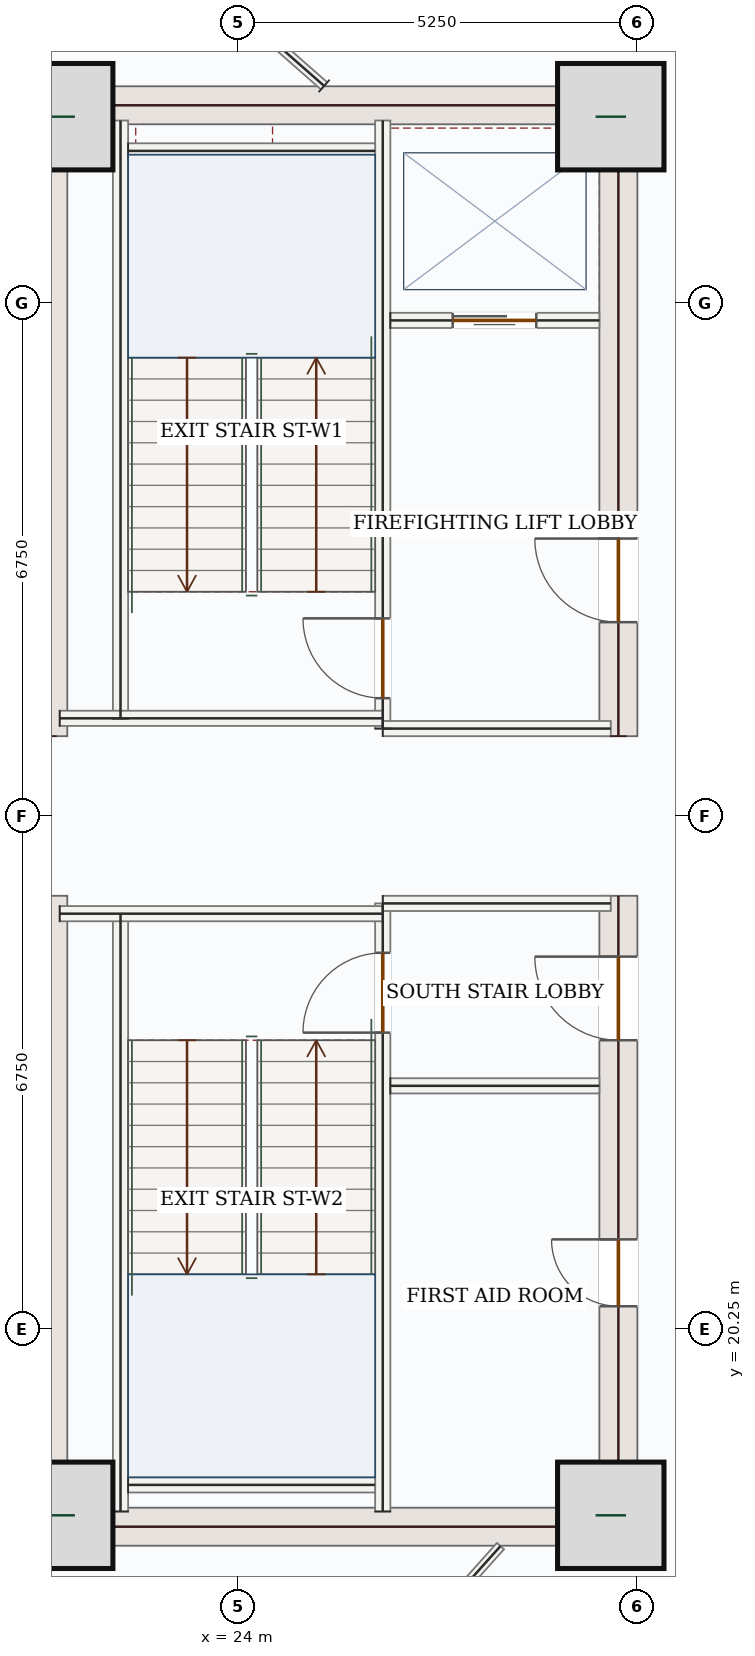
"""IFC4 building model, lengths in metres.
Left out: names, types, materials, properties, quantities, classifications, styles, units other than length and angle.
Written with IfcOpenShell. Run it as: python <this file> out.ifc"""

import sys

from ifc_helpers import new_model, si_unit, direction, frame, frame_2d, origin, origin_2d, place, context, subcontext, project, spatial, rectangle, extrude, source, transform, mapped, element, fill, save


model = new_model("IFC4")
c1 = context("Model", 3, precision=1e-05, world=origin(), true_north=direction((0.0, 1.0)))
c2 = subcontext(c1, "Body", "Model", "MODEL_VIEW")
j1 = project(units=[si_unit("LENGTHUNIT", "METRE"), si_unit("PLANEANGLEUNIT", "RADIAN")], contexts=[c1])
p1 = place(None, origin())
s1 = spatial("IfcSite", under=j1, at=p1, CompositionType="ELEMENT")
p2 = place(p1, origin())
s2 = spatial("IfcBuilding", under=s1, at=p2, CompositionType="ELEMENT")
p3 = place(p2, frame((0.0, 0.0, 66.9)))
s3 = spatial("IfcBuildingStorey", under=s2, at=p3, CompositionType="ELEMENT", Elevation=66.9)
m1 = source(origin(), c2, "Body", "SweptSolid", [
    extrude(rectangle(XDim=8.55, YDim=0.5, at=frame_2d((4.275, 0.0))), origin(), (0.0, 0.0, 1.0), 3.95),
])
for number, where, z_axis, x_axis in (
    (1, (21.5, 17.4, 0.0), (0.0, 0.0, 1.0), (0.0, 1.0, 0.0)),
    (2, (21.5, 28.05, 0.0), (0.0, 0.0, 1.0), (0.0, 1.0, 0.0)),
):
    element("IfcWall", number, at=place(p3, frame(where, z_axis=z_axis, x_axis=x_axis)), inside=s3, PredefinedType="SHEAR", context=c2, shape_type="MappedRepresentation", body=[
        mapped(m1, transform((0.0, 0.0, 0.0), x_axis=(1.0, 0.0, 0.0), y_axis=(0.0, 1.0, 0.0), z_axis=(0.0, 0.0, 1.0), scale=1.0)),
    ])
p4 = place(p3, frame((29.0, 17.4, 0.0), z_axis=(0.0, 0.0, 1.0), x_axis=(0.0, 1.0, 0.0)))
e3 = element("IfcWall", 3, at=p4, inside=s3, PredefinedType="SHEAR", context=c2, shape_type="SweptSolid", body=[
    extrude(rectangle(XDim=8.55, YDim=0.5, at=frame_2d((4.275, 0.0))), origin(), (0.0, 0.0, 1.0), 3.95),
])
p5 = place(p4, frame((6.65, 0.0, 0.0)))
e4 = element("IfcOpeningElement", 4, at=p5, cuts=e3, PredefinedType="OPENING", context=c2, shape_type="SweptSolid", body=[
    extrude(rectangle(XDim=1.1, YDim=2.2, at=frame_2d((0.55, 1.1))), frame((0.0, 0.26, 0.0), z_axis=(0.0, -1.0, 0.0), x_axis=(1.0, 0.0, 0.0)), (0.0, 0.0, 1.0), 0.52),
])
p6 = place(p4, frame((3.15, 0.0, 0.0)))
e5 = element("IfcOpeningElement", 5, at=p6, cuts=e3, PredefinedType="OPENING", context=c2, shape_type="SweptSolid", body=[
    extrude(rectangle(XDim=0.88, YDim=2.1, at=frame_2d((0.44, 1.05))), frame((0.0, 0.26, 0.0), z_axis=(0.0, -1.0, 0.0), x_axis=(1.0, 0.0, 0.0)), (0.0, 0.0, 1.0), 0.52),
])
p7 = place(p3, frame((29.0, 28.05, 0.0), z_axis=(0.0, 0.0, 1.0), x_axis=(0.0, 1.0, 0.0)))
e6 = element("IfcWall", 6, at=p7, inside=s3, PredefinedType="SHEAR", context=c2, shape_type="SweptSolid", body=[
    extrude(rectangle(XDim=8.55, YDim=0.5, at=frame_2d((4.275, 0.0))), origin(), (0.0, 0.0, 1.0), 3.95),
])
p8 = place(p7, frame((1.5, 0.0, 0.0)))
e7 = element("IfcOpeningElement", 7, at=p8, cuts=e6, PredefinedType="OPENING", context=c2, shape_type="SweptSolid", body=[
    extrude(rectangle(XDim=1.1, YDim=2.2, at=frame_2d((0.55, 1.1))), frame((0.0, 0.26, 0.0), z_axis=(0.0, -1.0, 0.0), x_axis=(1.0, 0.0, 0.0)), (0.0, 0.0, 1.0), 0.52),
])
m2 = source(origin(), c2, "Body", "SweptSolid", [
    extrude(rectangle(XDim=7.0, YDim=0.5, at=frame_2d((3.5, 0.0))), origin(), (0.0, 0.0, 1.0), 3.95),
])
for number, where, z_axis, x_axis in (
    (8, (21.75, 17.65, 0.0), (0.0, 0.0, 1.0), (1.0, 0.0, 0.0)),
    (9, (21.75, 36.35, 0.0), (0.0, 0.0, 1.0), (1.0, 0.0, 0.0)),
):
    element("IfcWall", number, at=place(p3, frame(where, z_axis=z_axis, x_axis=x_axis)), inside=s3, PredefinedType="SHEAR", context=c2, shape_type="MappedRepresentation", body=[
        mapped(m2, transform((0.0, 0.0, 0.0), x_axis=(1.0, 0.0, 0.0), y_axis=(0.0, 1.0, 0.0), z_axis=(0.0, 0.0, 1.0), scale=1.0)),
    ])
m3 = source(origin(), c2, "Body", "SweptSolid", [
    extrude(rectangle(XDim=1.4, YDim=1.4, at=origin_2d()), origin(), (0.0, 0.0, 1.0), 4.2),
])
for number, where, z_axis, x_axis in (
    (10, (21.65, 17.8, 0.0), (0.0, 0.0, 1.0), (1.0, 0.0, 0.0)),
    (11, (28.9, 17.8, 0.0), (0.0, 0.0, 1.0), (1.0, 0.0, 0.0)),
    (12, (21.65, 36.2, 0.0), (0.0, 0.0, 1.0), (1.0, 0.0, 0.0)),
    (13, (28.9, 36.2, 0.0), (0.0, 0.0, 1.0), (1.0, 0.0, 0.0)),
):
    element("IfcColumn", number, at=place(p3, frame(where, z_axis=z_axis, x_axis=x_axis)), inside=s3, PredefinedType="COLUMN", context=c2, shape_type="MappedRepresentation", body=[
        mapped(m3, transform((0.0, 0.0, 0.0), x_axis=(1.0, 0.0, 0.0), y_axis=(0.0, 1.0, 0.0), z_axis=(0.0, 0.0, 1.0), scale=1.0)),
    ])
p9 = place(p3, frame((22.658, 14.74, 0.0), z_axis=(0.0, 0.0, 1.0), x_axis=(-0.707106781187, 0.707106781187, 0.0)))
e14 = element("IfcWall", 14, at=p9, inside=s3, PredefinedType="SOLIDWALL", context=c2, shape_type="SweptSolid", body=[
    extrude(rectangle(XDim=5.258, YDim=0.32, at=frame_2d((2.629, 0.0))), origin(), (0.0, 0.0, 1.0), 3.95),
])
p10 = place(p9, frame((1.429, 0.0, 0.85)))
e15 = element("IfcOpeningElement", 15, at=p10, cuts=e14, PredefinedType="OPENING", context=c2, shape_type="SweptSolid", body=[
    extrude(rectangle(XDim=2.4, YDim=1.8, at=frame_2d((1.2, 0.9))), frame((0.0, 0.17, 0.0), z_axis=(0.0, -1.0, 0.0), x_axis=(1.0, 0.0, 0.0)), (0.0, 0.0, 1.0), 0.34),
])
m4 = source(origin(), c2, "Body", "SweptSolid", [
    extrude(rectangle(XDim=5.258, YDim=0.32, at=frame_2d((2.629, 0.0))), origin(), (0.0, 0.0, 1.0), 3.95),
])
p11 = place(p3, frame((18.94, 35.542, 0.0), z_axis=(0.0, 0.0, 1.0), x_axis=(0.707106781187, 0.707106781187, 0.0)))
e16 = element("IfcWall", 16, at=p11, inside=s3, PredefinedType="SOLIDWALL", context=c2, shape_type="MappedRepresentation", body=[
    mapped(m4, transform((0.0, 0.0, 0.0), x_axis=(1.0, 0.0, 0.0), y_axis=(0.0, 1.0, 0.0), z_axis=(0.0, 0.0, 1.0), scale=1.0)),
])
m5 = source(origin(), c2, "Body", "SweptSolid", [
    extrude(rectangle(XDim=7.87, YDim=0.2, at=frame_2d((3.935, 0.0))), origin(), (0.0, 0.0, 1.0), 3.95),
])
for number, where, z_axis, x_axis in (
    (17, (22.45, 17.85, 0.0), (0.0, 0.0, 1.0), (0.0, 1.0, 0.0)),
    (18, (22.45, 28.28, 0.0), (0.0, 0.0, 1.0), (0.0, 1.0, 0.0)),
):
    element("IfcWall", number, at=place(p3, frame(where, z_axis=z_axis, x_axis=x_axis)), inside=s3, PredefinedType="SOLIDWALL", context=c2, shape_type="MappedRepresentation", body=[
        mapped(m5, transform((0.0, 0.0, 0.0), x_axis=(1.0, 0.0, 0.0), y_axis=(0.0, 1.0, 0.0), z_axis=(0.0, 0.0, 1.0), scale=1.0)),
    ])
p12 = place(p3, frame((25.9, 17.85, 0.0), z_axis=(0.0, 0.0, 1.0), x_axis=(0.0, 1.0, 0.0)))
e19 = element("IfcWall", 19, at=p12, inside=s3, PredefinedType="SOLIDWALL", context=c2, shape_type="SweptSolid", body=[
    extrude(rectangle(XDim=8.0, YDim=0.2, at=frame_2d((4.0, 0.0))), origin(), (0.0, 0.0, 1.0), 3.95),
])
p13 = place(p12, frame((6.3, 0.0, 0.0)))
e20 = element("IfcOpeningElement", 20, at=p13, cuts=e19, PredefinedType="OPENING", context=c2, shape_type="SweptSolid", body=[
    extrude(rectangle(XDim=1.05, YDim=2.15, at=frame_2d((0.525, 1.075))), frame((0.0, 0.11, 0.0), z_axis=(0.0, -1.0, 0.0), x_axis=(1.0, 0.0, 0.0)), (0.0, 0.0, 1.0), 0.22),
])
p14 = place(p3, frame((25.9, 28.15, 0.0), z_axis=(0.0, 0.0, 1.0), x_axis=(0.0, 1.0, 0.0)))
e21 = element("IfcWall", 21, at=p14, inside=s3, PredefinedType="SOLIDWALL", context=c2, shape_type="SweptSolid", body=[
    extrude(rectangle(XDim=8.0, YDim=0.2, at=frame_2d((4.0, 0.0))), origin(), (0.0, 0.0, 1.0), 3.95),
])
p15 = place(p14, frame((0.4, 0.0, 0.0)))
e22 = element("IfcOpeningElement", 22, at=p15, cuts=e21, PredefinedType="OPENING", context=c2, shape_type="SweptSolid", body=[
    extrude(rectangle(XDim=1.05, YDim=2.15, at=frame_2d((0.525, 1.075))), frame((0.0, 0.11, 0.0), z_axis=(0.0, -1.0, 0.0), x_axis=(1.0, 0.0, 0.0)), (0.0, 0.0, 1.0), 0.22),
])
m6 = source(origin(), c2, "Body", "SweptSolid", [
    extrude(rectangle(XDim=4.25, YDim=0.2, at=frame_2d((2.125, 0.0))), origin(), (0.0, 0.0, 1.0), 3.95),
])
p16 = place(p3, frame((21.65, 25.715, 0.0), z_axis=(0.0, 0.0, 1.0), x_axis=(1.0, 0.0, 0.0)))
e23 = element("IfcWall", 23, at=p16, inside=s3, PredefinedType="SOLIDWALL", context=c2, shape_type="MappedRepresentation", body=[
    mapped(m6, transform((0.0, 0.0, 0.0), x_axis=(1.0, 0.0, 0.0), y_axis=(0.0, 1.0, 0.0), z_axis=(0.0, 0.0, 1.0), scale=1.0)),
])
m7 = source(origin(), c2, "Body", "SweptSolid", [
    extrude(rectangle(XDim=3.0, YDim=0.2, at=frame_2d((1.5, 0.0))), origin(), (0.0, 0.0, 1.0), 3.95),
])
p17 = place(p3, frame((25.9, 25.85, 0.0), z_axis=(0.0, 0.0, 1.0), x_axis=(1.0, 0.0, 0.0)))
e24 = element("IfcWall", 24, at=p17, inside=s3, PredefinedType="SOLIDWALL", context=c2, shape_type="MappedRepresentation", body=[
    mapped(m7, transform((0.0, 0.0, 0.0), x_axis=(1.0, 0.0, 0.0), y_axis=(0.0, 1.0, 0.0), z_axis=(0.0, 0.0, 1.0), scale=1.0)),
])
p18 = place(p3, frame((21.65, 28.285, 0.0), z_axis=(0.0, 0.0, 1.0), x_axis=(1.0, 0.0, 0.0)))
e25 = element("IfcWall", 25, at=p18, inside=s3, PredefinedType="SOLIDWALL", context=c2, shape_type="MappedRepresentation", body=[
    mapped(m6, transform((0.0, 0.0, 0.0), x_axis=(1.0, 0.0, 0.0), y_axis=(0.0, 1.0, 0.0), z_axis=(0.0, 0.0, 1.0), scale=1.0)),
])
p19 = place(p3, frame((25.9, 28.15, 0.0), z_axis=(0.0, 0.0, 1.0), x_axis=(1.0, 0.0, 0.0)))
e26 = element("IfcWall", 26, at=p19, inside=s3, PredefinedType="SOLIDWALL", context=c2, shape_type="MappedRepresentation", body=[
    mapped(m7, transform((0.0, 0.0, 0.0), x_axis=(1.0, 0.0, 0.0), y_axis=(0.0, 1.0, 0.0), z_axis=(0.0, 0.0, 1.0), scale=1.0)),
])
m8 = source(origin(), c2, "Body", "SweptSolid", [
    extrude(rectangle(XDim=3.25, YDim=0.2, at=frame_2d((1.625, 0.0))), origin(), (0.0, 0.0, 1.0), 3.95),
])
for number, where, z_axis, x_axis in (
    (27, (22.55, 35.75, 0.0), (0.0, 0.0, 1.0), (1.0, 0.0, 0.0)),
    (28, (22.55, 18.2, 0.0), (0.0, 0.0, 1.0), (1.0, 0.0, 0.0)),
):
    element("IfcWall", number, at=place(p3, frame(where, z_axis=z_axis, x_axis=x_axis)), inside=s3, PredefinedType="SOLIDWALL", context=c2, shape_type="MappedRepresentation", body=[
        mapped(m8, transform((0.0, 0.0, 0.0), x_axis=(1.0, 0.0, 0.0), y_axis=(0.0, 1.0, 0.0), z_axis=(0.0, 0.0, 1.0), scale=1.0)),
    ])
p20 = place(p3, frame((26.0, 33.52, 0.0), z_axis=(0.0, 0.0, 1.0), x_axis=(1.0, 0.0, 0.0)))
e29 = element("IfcWall", 29, at=p20, inside=s3, PredefinedType="SOLIDWALL", context=c2, shape_type="SweptSolid", body=[
    extrude(rectangle(XDim=2.75, YDim=0.2, at=frame_2d((1.375, 0.0))), origin(), (0.0, 0.0, 1.0), 3.95),
])
p21 = place(p20, frame((0.82, 0.0, 0.0)))
e30 = element("IfcOpeningElement", 30, at=p21, cuts=e29, PredefinedType="OPENING", context=c2, shape_type="SweptSolid", body=[
    extrude(rectangle(XDim=1.1, YDim=2.15, at=frame_2d((0.55, 1.075))), frame((0.0, 0.11, 0.0), z_axis=(0.0, -1.0, 0.0), x_axis=(1.0, 0.0, 0.0)), (0.0, 0.0, 1.0), 0.22),
])
m9 = source(origin(), c2, "Body", "SweptSolid", [
    extrude(rectangle(XDim=2.75, YDim=0.2, at=frame_2d((1.375, 0.0))), origin(), (0.0, 0.0, 1.0), 3.95),
])
p22 = place(p3, frame((26.0, 23.45, 0.0), z_axis=(0.0, 0.0, 1.0), x_axis=(1.0, 0.0, 0.0)))
e31 = element("IfcWall", 31, at=p22, inside=s3, PredefinedType="SOLIDWALL", context=c2, shape_type="MappedRepresentation", body=[
    mapped(m9, transform((0.0, 0.0, 0.0), x_axis=(1.0, 0.0, 0.0), y_axis=(0.0, 1.0, 0.0), z_axis=(0.0, 0.0, 1.0), scale=1.0)),
])
m10 = source(origin(), c2, "Body", "SweptSolid", [
    extrude(rectangle(XDim=3.348, YDim=0.125, at=frame_2d((1.674, 0.0))), origin(), (0.0, 0.0, 1.0), 3.95),
])
p23 = place(p3, frame((25.215, 14.901, 0.0), z_axis=(0.0, 0.0, 1.0), x_axis=(0.667206176518, 0.74487308853, 0.0)))
e32 = element("IfcWall", 32, at=p23, inside=s3, PredefinedType="PARTITIONING", context=c2, shape_type="MappedRepresentation", body=[
    mapped(m10, transform((0.0, 0.0, 0.0), x_axis=(1.0, 0.0, 0.0), y_axis=(0.0, 1.0, 0.0), z_axis=(0.0, 0.0, 1.0), scale=1.0)),
])
m11 = source(origin(), c2, "Body", "SweptSolid", [
    extrude(rectangle(XDim=3.467, YDim=0.125, at=frame_2d((1.733, 0.0))), origin(), (0.0, 0.0, 1.0), 3.95),
])
p24 = place(p3, frame((25.129, 36.605, 0.0), z_axis=(0.0, 0.0, 1.0), x_axis=(-0.751135268809, 0.66014832269, 0.0)))
e33 = element("IfcWall", 33, at=p24, inside=s3, PredefinedType="PARTITIONING", context=c2, shape_type="MappedRepresentation", body=[
    mapped(m11, transform((0.0, 0.0, 0.0), x_axis=(1.0, 0.0, 0.0), y_axis=(0.0, 1.0, 0.0), z_axis=(0.0, 0.0, 1.0), scale=1.0)),
])
m12 = source(origin(), c2, "Body", "SweptSolid", [
    extrude(rectangle(XDim=2.4, YDim=1.8, at=frame_2d((1.2, 0.9))), frame((0.0, 0.03, 0.0), z_axis=(0.0, -1.0, 0.0), x_axis=(1.0, 0.0, 0.0)), (0.0, 0.0, 1.0), 0.06),
])
p25 = place(p10, origin())
e34 = element("IfcWindow", 34, at=p25, inside=s3, PartitioningType="DOUBLE_PANEL_VERTICAL", PredefinedType="WINDOW", context=c2, shape_type="MappedRepresentation", body=[
    mapped(m12, transform((0.0, 0.0, 0.0), x_axis=(1.0, 0.0, 0.0), y_axis=(0.0, 1.0, 0.0), z_axis=(0.0, 0.0, 1.0), scale=1.0)),
])
fill(e15, e34)
m13 = source(origin(), c2, "Body", "SweptSolid", [
    extrude(rectangle(XDim=1.05, YDim=2.15, at=frame_2d((0.525, 1.075))), frame((0.0, 0.025, 0.0), z_axis=(0.0, -1.0, 0.0), x_axis=(1.0, 0.0, 0.0)), (0.0, 0.0, 1.0), 0.05),
])
p26 = place(p15, origin())
e35 = element("IfcDoor", 35, at=p26, inside=s3, OperationType="SINGLE_SWING_RIGHT", PredefinedType="DOOR", context=c2, shape_type="MappedRepresentation", body=[
    mapped(m13, transform((0.0, 0.0, 0.0), x_axis=(1.0, 0.0, 0.0), y_axis=(0.0, 1.0, 0.0), z_axis=(0.0, 0.0, 1.0), scale=1.0)),
])
fill(e22, e35)
p27 = place(p13, origin())
e36 = element("IfcDoor", 36, at=p27, inside=s3, OperationType="SINGLE_SWING_LEFT", PredefinedType="DOOR", context=c2, shape_type="MappedRepresentation", body=[
    mapped(m13, transform((0.0, 0.0, 0.0), x_axis=(1.0, 0.0, 0.0), y_axis=(0.0, 1.0, 0.0), z_axis=(0.0, 0.0, 1.0), scale=1.0)),
])
fill(e20, e36)
m14 = source(origin(), c2, "Body", "SweptSolid", [
    extrude(rectangle(XDim=1.1, YDim=2.15, at=frame_2d((0.55, 1.075))), frame((0.0, 0.025, 0.0), z_axis=(0.0, -1.0, 0.0), x_axis=(1.0, 0.0, 0.0)), (0.0, 0.0, 1.0), 0.05),
])
p28 = place(p21, origin())
e37 = element("IfcDoor", 37, at=p28, inside=s3, OperationType="DOUBLE_DOOR_SLIDING", PredefinedType="DOOR", context=c2, shape_type="MappedRepresentation", body=[
    mapped(m14, transform((0.0, 0.0, 0.0), x_axis=(1.0, 0.0, 0.0), y_axis=(0.0, 1.0, 0.0), z_axis=(0.0, 0.0, 1.0), scale=1.0)),
])
fill(e30, e37)
m15 = source(origin(), c2, "Body", "SweptSolid", [
    extrude(rectangle(XDim=1.1, YDim=2.2, at=frame_2d((0.55, 1.1))), frame((0.0, 0.025, 0.0), z_axis=(0.0, -1.0, 0.0), x_axis=(1.0, 0.0, 0.0)), (0.0, 0.0, 1.0), 0.05),
])
p29 = place(p8, origin())
e38 = element("IfcDoor", 38, at=p29, inside=s3, OperationType="SINGLE_SWING_RIGHT", PredefinedType="DOOR", context=c2, shape_type="MappedRepresentation", body=[
    mapped(m15, transform((0.0, 0.0, 0.0), x_axis=(1.0, 0.0, 0.0), y_axis=(0.0, 1.0, 0.0), z_axis=(0.0, 0.0, 1.0), scale=1.0)),
])
fill(e7, e38)
p30 = place(p5, origin())
e39 = element("IfcDoor", 39, at=p30, inside=s3, OperationType="SINGLE_SWING_RIGHT", PredefinedType="DOOR", context=c2, shape_type="MappedRepresentation", body=[
    mapped(m15, transform((0.0, 0.0, 0.0), x_axis=(1.0, 0.0, 0.0), y_axis=(0.0, 1.0, 0.0), z_axis=(0.0, 0.0, 1.0), scale=1.0)),
])
fill(e4, e39)
m16 = source(origin(), c2, "Body", "SweptSolid", [
    extrude(rectangle(XDim=0.88, YDim=2.1, at=frame_2d((0.44, 1.05))), frame((0.0, 0.025, 0.0), z_axis=(0.0, -1.0, 0.0), x_axis=(1.0, 0.0, 0.0)), (0.0, 0.0, 1.0), 0.05),
])
p31 = place(p6, origin())
e40 = element("IfcDoor", 40, at=p31, inside=s3, OperationType="SINGLE_SWING_RIGHT", PredefinedType="DOOR", context=c2, shape_type="MappedRepresentation", body=[
    mapped(m16, transform((0.0, 0.0, 0.0), x_axis=(1.0, 0.0, 0.0), y_axis=(0.0, 1.0, 0.0), z_axis=(0.0, 0.0, 1.0), scale=1.0)),
])
fill(e5, e40)
save(model, sys.argv[1])
